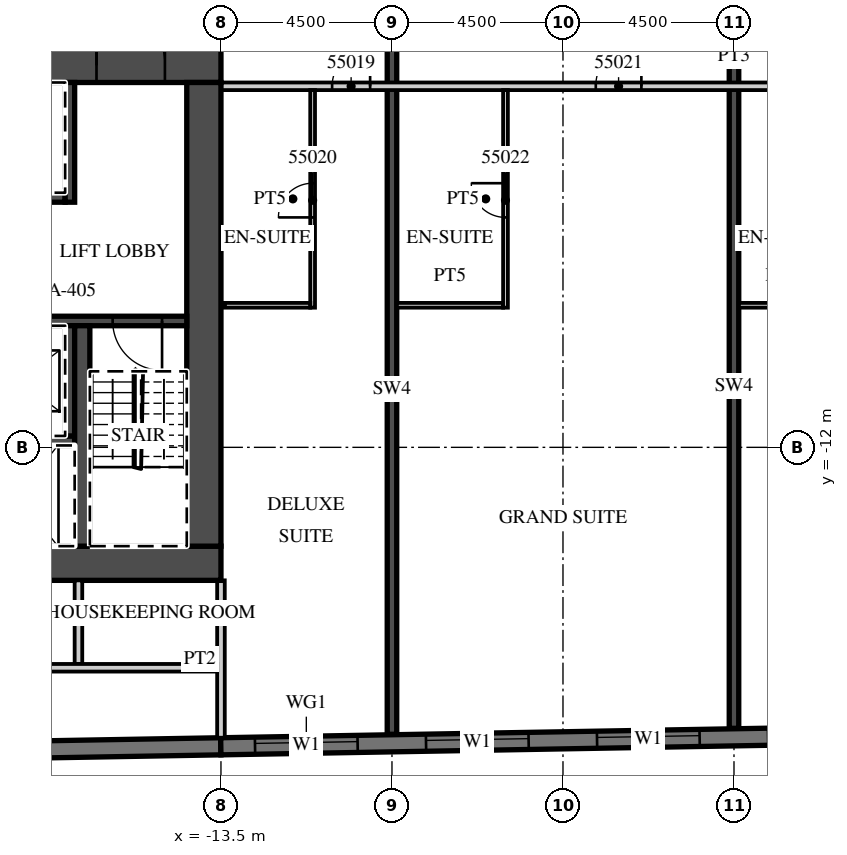
"""IFC4 building model, lengths in metres.
Left out: names, types, materials, properties, quantities, classifications, styles, units other than length and angle.
Written with IfcOpenShell. Run it as: python <this file> out.ifc"""

import sys

from ifc_helpers import new_model, si_unit, direction, frame, frame_2d, origin, place, context, subcontext, project, spatial, rectangle, extrude, element, fill, save


model = new_model("IFC4")
c1 = context("Model", 3, precision=1e-05, world=origin(), true_north=direction((0.0, 1.0)))
c2 = subcontext(c1, "Body", "Model", "MODEL_VIEW")
j1 = project(units=[si_unit("LENGTHUNIT", "METRE"), si_unit("PLANEANGLEUNIT", "RADIAN")], contexts=[c1])
p1 = place(None, origin())
s1 = spatial("IfcSite", under=j1, at=p1, CompositionType="ELEMENT")
p2 = place(p1, origin())
s2 = spatial("IfcBuilding", under=s1, at=p2, CompositionType="ELEMENT")
p3 = place(p2, frame((0.0, 0.0, 227.6)))
s3 = spatial("IfcBuildingStorey", under=s2, at=p3, CompositionType="ELEMENT", Elevation=227.6)
p4 = place(p3, frame((-9.0, -19.55, 0.0), z_axis=(0.0, 0.0, 1.0), x_axis=(0.0, 1.0, 0.0)))
e1 = element("IfcWall", 1, at=p4, inside=s3, PredefinedType="SHEAR", context=c2, shape_type="SweptSolid", body=[
    extrude(rectangle(XDim=18.15, YDim=0.25, at=frame_2d((9.075, 0.0))), origin(), (0.0, 0.0, 1.0), 3.3),
])
p5 = place(p3, frame((0.0, -19.393, 0.0), z_axis=(0.0, 0.0, 1.0), x_axis=(0.0, 1.0, 0.0)))
e2 = element("IfcWall", 2, at=p5, inside=s3, PredefinedType="SHEAR", context=c2, shape_type="SweptSolid", body=[
    extrude(rectangle(XDim=17.993, YDim=0.25, at=frame_2d((8.997, 0.0))), origin(), (0.0, 0.0, 1.0), 3.3),
])
p6 = place(p3, frame((-31.504, -20.18, 0.0), z_axis=(0.0, 0.0, 1.0), x_axis=(0.999847677887, 0.017453395744, 0.0)))
e3 = element("IfcWall", 3, at=p6, inside=s3, PredefinedType="SOLIDWALL", context=c2, shape_type="SweptSolid", body=[
    extrude(rectangle(XDim=18.003, YDim=0.45, at=frame_2d((9.001, 0.0))), origin(), (0.0, 0.0, 1.0), 3.02),
])
p7 = place(p3, frame((-13.504, -19.866, 0.0), z_axis=(0.0, 0.0, 1.0), x_axis=(0.999847672978, 0.017453676992, 0.0)))
e4 = element("IfcWall", 4, at=p7, inside=s3, PredefinedType="SOLIDWALL", context=c2, shape_type="SweptSolid", body=[
    extrude(rectangle(XDim=52.86, YDim=0.45, at=frame_2d((26.43, 0.0))), origin(), (0.0, 0.0, 1.0), 3.02),
])
p8 = place(p7, frame((0.9, 0.0, 0.45)))
e5 = element("IfcOpeningElement", 5, at=p8, cuts=e4, PredefinedType="OPENING", context=c2, shape_type="SweptSolid", body=[
    extrude(rectangle(XDim=2.7, YDim=2.25, at=frame_2d((1.35, 1.125))), frame((0.0, 0.235, 0.0), z_axis=(0.0, -1.0, 0.0), x_axis=(1.0, 0.0, 0.0)), (0.0, 0.0, 1.0), 0.47),
])
p9 = place(p7, frame((5.401, 0.0, 0.45)))
e6 = element("IfcOpeningElement", 6, at=p9, cuts=e4, PredefinedType="OPENING", context=c2, shape_type="SweptSolid", body=[
    extrude(rectangle(XDim=2.7, YDim=2.25, at=frame_2d((1.35, 1.125))), frame((0.0, 0.235, 0.0), z_axis=(0.0, -1.0, 0.0), x_axis=(1.0, 0.0, 0.0)), (0.0, 0.0, 1.0), 0.47),
])
p10 = place(p7, frame((9.902, 0.0, 0.45)))
e7 = element("IfcOpeningElement", 7, at=p10, cuts=e4, PredefinedType="OPENING", context=c2, shape_type="SweptSolid", body=[
    extrude(rectangle(XDim=2.7, YDim=2.25, at=frame_2d((1.35, 1.125))), frame((0.0, 0.235, 0.0), z_axis=(0.0, -1.0, 0.0), x_axis=(1.0, 0.0, 0.0)), (0.0, 0.0, 1.0), 0.47),
])
p11 = place(p7, frame((14.402, 0.0, 0.45)))
e8 = element("IfcOpeningElement", 8, at=p11, cuts=e4, PredefinedType="OPENING", context=c2, shape_type="SweptSolid", body=[
    extrude(rectangle(XDim=2.7, YDim=2.25, at=frame_2d((1.35, 1.125))), frame((0.0, 0.235, 0.0), z_axis=(0.0, -1.0, 0.0), x_axis=(1.0, 0.0, 0.0)), (0.0, 0.0, 1.0), 0.47),
])
p12 = place(p7, frame((18.903, 0.0, 0.45)))
e9 = element("IfcOpeningElement", 9, at=p12, cuts=e4, PredefinedType="OPENING", context=c2, shape_type="SweptSolid", body=[
    extrude(rectangle(XDim=2.7, YDim=2.25, at=frame_2d((1.35, 1.125))), frame((0.0, 0.235, 0.0), z_axis=(0.0, -1.0, 0.0), x_axis=(1.0, 0.0, 0.0)), (0.0, 0.0, 1.0), 0.47),
])
p13 = place(p7, frame((23.404, 0.0, 0.45)))
e10 = element("IfcOpeningElement", 10, at=p13, cuts=e4, PredefinedType="OPENING", context=c2, shape_type="SweptSolid", body=[
    extrude(rectangle(XDim=2.7, YDim=2.25, at=frame_2d((1.35, 1.125))), frame((0.0, 0.235, 0.0), z_axis=(0.0, -1.0, 0.0), x_axis=(1.0, 0.0, 0.0)), (0.0, 0.0, 1.0), 0.47),
])
p14 = place(p7, frame((27.904, 0.0, 0.45)))
e11 = element("IfcOpeningElement", 11, at=p14, cuts=e4, PredefinedType="OPENING", context=c2, shape_type="SweptSolid", body=[
    extrude(rectangle(XDim=2.7, YDim=2.25, at=frame_2d((1.35, 1.125))), frame((0.0, 0.235, 0.0), z_axis=(0.0, -1.0, 0.0), x_axis=(1.0, 0.0, 0.0)), (0.0, 0.0, 1.0), 0.47),
])
p15 = place(p7, frame((32.405, 0.0, 0.45)))
e12 = element("IfcOpeningElement", 12, at=p15, cuts=e4, PredefinedType="OPENING", context=c2, shape_type="SweptSolid", body=[
    extrude(rectangle(XDim=2.7, YDim=2.25, at=frame_2d((1.35, 1.125))), frame((0.0, 0.235, 0.0), z_axis=(0.0, -1.0, 0.0), x_axis=(1.0, 0.0, 0.0)), (0.0, 0.0, 1.0), 0.47),
])
p16 = place(p7, frame((36.906, 0.0, 0.45)))
e13 = element("IfcOpeningElement", 13, at=p16, cuts=e4, PredefinedType="OPENING", context=c2, shape_type="SweptSolid", body=[
    extrude(rectangle(XDim=2.7, YDim=2.25, at=frame_2d((1.35, 1.125))), frame((0.0, 0.235, 0.0), z_axis=(0.0, -1.0, 0.0), x_axis=(1.0, 0.0, 0.0)), (0.0, 0.0, 1.0), 0.47),
])
p17 = place(p7, frame((41.406, 0.0, 0.45)))
e14 = element("IfcOpeningElement", 14, at=p17, cuts=e4, PredefinedType="OPENING", context=c2, shape_type="SweptSolid", body=[
    extrude(rectangle(XDim=2.7, YDim=2.25, at=frame_2d((1.35, 1.125))), frame((0.0, 0.235, 0.0), z_axis=(0.0, -1.0, 0.0), x_axis=(1.0, 0.0, 0.0)), (0.0, 0.0, 1.0), 0.47),
])
p18 = place(p7, frame((45.907, 0.0, 0.45)))
e15 = element("IfcOpeningElement", 15, at=p18, cuts=e4, PredefinedType="OPENING", context=c2, shape_type="SweptSolid", body=[
    extrude(rectangle(XDim=2.7, YDim=2.25, at=frame_2d((1.35, 1.125))), frame((0.0, 0.235, 0.0), z_axis=(0.0, -1.0, 0.0), x_axis=(1.0, 0.0, 0.0)), (0.0, 0.0, 1.0), 0.47),
])
p19 = place(p3, frame((-13.5, -19.641, 0.0), z_axis=(0.0, 0.0, 1.0), x_axis=(0.0, 1.0, 0.0)))
e16 = element("IfcWall", 16, at=p19, inside=s3, PredefinedType="PARTITIONING", context=c2, shape_type="SweptSolid", body=[
    extrude(rectangle(XDim=4.141, YDim=0.2, at=frame_2d((2.071, 0.0))), origin(), (0.0, 0.0, 1.0), 3.02),
])
p20 = place(p3, frame((-13.5, -2.5, 0.0), z_axis=(0.0, 0.0, 1.0), x_axis=(1.0, 0.0, 0.0)))
e17 = element("IfcWall", 17, at=p20, inside=s3, PredefinedType="PARTITIONING", context=c2, shape_type="SweptSolid", body=[
    extrude(rectangle(XDim=27.0, YDim=0.2, at=frame_2d((13.5, 0.0))), origin(), (0.0, 0.0, 1.0), 3.02),
])
p21 = place(p20, frame((2.925, 0.0, 0.0)))
e18 = element("IfcOpeningElement", 18, at=p21, cuts=e17, PredefinedType="OPENING", context=c2, shape_type="SweptSolid", body=[
    extrude(rectangle(XDim=1.0, YDim=2.1, at=frame_2d((0.5, 1.05))), frame((0.0, 0.11, 0.0), z_axis=(0.0, -1.0, 0.0), x_axis=(1.0, 0.0, 0.0)), (0.0, 0.0, 1.0), 0.22),
])
p22 = place(p20, frame((9.863, 0.0, 0.0)))
e19 = element("IfcOpeningElement", 19, at=p22, cuts=e17, PredefinedType="OPENING", context=c2, shape_type="SweptSolid", body=[
    extrude(rectangle(XDim=1.2, YDim=2.1, at=frame_2d((0.6, 1.05))), frame((0.0, 0.11, 0.0), z_axis=(0.0, -1.0, 0.0), x_axis=(1.0, 0.0, 0.0)), (0.0, 0.0, 1.0), 0.22),
])
p23 = place(p20, frame((16.45, 0.0, 0.0)))
e20 = element("IfcOpeningElement", 20, at=p23, cuts=e17, PredefinedType="OPENING", context=c2, shape_type="SweptSolid", body=[
    extrude(rectangle(XDim=1.0, YDim=2.1, at=frame_2d((0.5, 1.05))), frame((0.0, 0.11, 0.0), z_axis=(0.0, -1.0, 0.0), x_axis=(1.0, 0.0, 0.0)), (0.0, 0.0, 1.0), 0.22),
])
p24 = place(p20, frame((20.925, 0.0, 0.0)))
e21 = element("IfcOpeningElement", 21, at=p24, cuts=e17, PredefinedType="OPENING", context=c2, shape_type="SweptSolid", body=[
    extrude(rectangle(XDim=1.0, YDim=2.1, at=frame_2d((0.5, 1.05))), frame((0.0, 0.11, 0.0), z_axis=(0.0, -1.0, 0.0), x_axis=(1.0, 0.0, 0.0)), (0.0, 0.0, 1.0), 0.22),
])
p25 = place(p20, frame((25.425, 0.0, 0.0)))
e22 = element("IfcOpeningElement", 22, at=p25, cuts=e17, PredefinedType="OPENING", context=c2, shape_type="SweptSolid", body=[
    extrude(rectangle(XDim=1.0, YDim=2.1, at=frame_2d((0.5, 1.05))), frame((0.0, 0.11, 0.0), z_axis=(0.0, -1.0, 0.0), x_axis=(1.0, 0.0, 0.0)), (0.0, 0.0, 1.0), 0.22),
])
p26 = place(p3, frame((-11.088, -8.325, 0.0), z_axis=(0.0, 0.0, 1.0), x_axis=(0.0, 1.0, 0.0)))
e23 = element("IfcWall", 23, at=p26, inside=s3, PredefinedType="PARTITIONING", context=c2, shape_type="SweptSolid", body=[
    extrude(rectangle(XDim=5.725, YDim=0.125, at=frame_2d((2.862, 0.0))), origin(), (0.0, 0.0, 1.0), 3.02),
])
p27 = place(p26, frame((2.375, 0.0, 0.0)))
e24 = element("IfcOpeningElement", 24, at=p27, cuts=e23, PredefinedType="OPENING", context=c2, shape_type="SweptSolid", body=[
    extrude(rectangle(XDim=0.9, YDim=2.1, at=frame_2d((0.45, 1.05))), frame((0.0, 0.073, 0.0), z_axis=(0.0, -1.0, 0.0), x_axis=(1.0, 0.0, 0.0)), (0.0, 0.0, 1.0), 0.145),
])
p28 = place(p3, frame((-13.4, -8.262, 0.0), z_axis=(0.0, 0.0, 1.0), x_axis=(1.0, 0.0, 0.0)))
e25 = element("IfcWall", 25, at=p28, inside=s3, PredefinedType="PARTITIONING", context=c2, shape_type="SweptSolid", body=[
    extrude(rectangle(XDim=2.25, YDim=0.125, at=frame_2d((1.125, 0.0))), origin(), (0.0, 0.0, 1.0), 3.02),
])
p29 = place(p3, frame((-6.013, -8.325, 0.0), z_axis=(0.0, 0.0, 1.0), x_axis=(0.0, 1.0, 0.0)))
e26 = element("IfcWall", 26, at=p29, inside=s3, PredefinedType="PARTITIONING", context=c2, shape_type="SweptSolid", body=[
    extrude(rectangle(XDim=5.725, YDim=0.125, at=frame_2d((2.862, 0.0))), origin(), (0.0, 0.0, 1.0), 3.02),
])
p30 = place(p29, frame((2.375, 0.0, 0.0)))
e27 = element("IfcOpeningElement", 27, at=p30, cuts=e26, PredefinedType="OPENING", context=c2, shape_type="SweptSolid", body=[
    extrude(rectangle(XDim=0.9, YDim=2.1, at=frame_2d((0.45, 1.05))), frame((0.0, 0.073, 0.0), z_axis=(0.0, -1.0, 0.0), x_axis=(1.0, 0.0, 0.0)), (0.0, 0.0, 1.0), 0.145),
])
p31 = place(p3, frame((-8.875, -8.262, 0.0), z_axis=(0.0, 0.0, 1.0), x_axis=(1.0, 0.0, 0.0)))
e28 = element("IfcWall", 28, at=p31, inside=s3, PredefinedType="PARTITIONING", context=c2, shape_type="SweptSolid", body=[
    extrude(rectangle(XDim=2.8, YDim=0.125, at=frame_2d((1.4, 0.0))), origin(), (0.0, 0.0, 1.0), 3.02),
])
p32 = place(p3, frame((0.125, -8.262, 0.0), z_axis=(0.0, 0.0, 1.0), x_axis=(1.0, 0.0, 0.0)))
e29 = element("IfcWall", 29, at=p32, inside=s3, PredefinedType="PARTITIONING", context=c2, shape_type="SweptSolid", body=[
    extrude(rectangle(XDim=2.25, YDim=0.125, at=frame_2d((1.125, 0.0))), origin(), (0.0, 0.0, 1.0), 3.02),
])
p33 = place(p3, frame((-31.5, -1.95, 0.0), z_axis=(0.0, 0.0, 1.0), x_axis=(1.0, 0.0, 0.0)))
e30 = element("IfcWall", 30, at=p33, inside=s3, PredefinedType="SHEAR", context=c2, shape_type="SweptSolid", body=[
    extrude(rectangle(XDim=18.0, YDim=0.9, at=frame_2d((9.0, 0.0))), origin(), (0.0, 0.0, 1.0), 3.02),
])
p34 = place(p33, frame((14.725, 0.0, 0.0)))
e31 = element("IfcOpeningElement", 31, at=p34, cuts=e30, PredefinedType="OPENING", context=c2, shape_type="SweptSolid", body=[
    extrude(rectangle(XDim=1.8, YDim=2.1, at=frame_2d((0.9, 1.05))), frame((0.0, 0.46, 0.0), z_axis=(0.0, -1.0, 0.0), x_axis=(1.0, 0.0, 0.0)), (0.0, 0.0, 1.0), 0.92),
])
p35 = place(p3, frame((-20.3, -15.05, 0.0), z_axis=(0.0, 0.0, 1.0), x_axis=(1.0, 0.0, 0.0)))
e32 = element("IfcWall", 32, at=p35, inside=s3, PredefinedType="SHEAR", context=c2, shape_type="SweptSolid", body=[
    extrude(rectangle(XDim=6.8, YDim=0.9, at=frame_2d((3.4, 0.0))), origin(), (0.0, 0.0, 1.0), 3.02),
])
p36 = place(p35, frame((0.875, 0.0, 0.0)))
e33 = element("IfcOpeningElement", 33, at=p36, cuts=e32, PredefinedType="OPENING", context=c2, shape_type="SweptSolid", body=[
    extrude(rectangle(XDim=1.2, YDim=2.1, at=frame_2d((0.6, 1.05))), frame((0.0, 0.46, 0.0), z_axis=(0.0, -1.0, 0.0), x_axis=(1.0, 0.0, 0.0)), (0.0, 0.0, 1.0), 0.92),
])
p37 = place(p3, frame((-13.95, -14.6, 0.0), z_axis=(0.0, 0.0, 1.0), x_axis=(0.0, 1.0, 0.0)))
e34 = element("IfcWall", 34, at=p37, inside=s3, PredefinedType="SHEAR", context=c2, shape_type="SweptSolid", body=[
    extrude(rectangle(XDim=12.2, YDim=0.9, at=frame_2d((6.1, 0.0))), origin(), (0.0, 0.0, 1.0), 3.02),
])
p38 = place(p3, frame((-30.6, -5.425, 0.0), z_axis=(0.0, 0.0, 1.0), x_axis=(1.0, 0.0, 0.0)))
e35 = element("IfcWall", 35, at=p38, inside=s3, PredefinedType="SHEAR", context=c2, shape_type="SweptSolid", body=[
    extrude(rectangle(XDim=13.0, YDim=0.25, at=frame_2d((6.5, 0.0))), origin(), (0.0, 0.0, 1.0), 3.02),
])
p39 = place(p38, frame((3.325, 0.0, 0.0)))
e36 = element("IfcOpeningElement", 36, at=p39, cuts=e35, PredefinedType="OPENING", context=c2, shape_type="SweptSolid", body=[
    extrude(rectangle(XDim=1.2, YDim=2.1, at=frame_2d((0.6, 1.05))), frame((0.0, 0.135, 0.0), z_axis=(0.0, -1.0, 0.0), x_axis=(1.0, 0.0, 0.0)), (0.0, 0.0, 1.0), 0.27),
])
p40 = place(p38, frame((5.925, 0.0, 0.0)))
e37 = element("IfcOpeningElement", 37, at=p40, cuts=e35, PredefinedType="OPENING", context=c2, shape_type="SweptSolid", body=[
    extrude(rectangle(XDim=1.2, YDim=2.1, at=frame_2d((0.6, 1.05))), frame((0.0, 0.135, 0.0), z_axis=(0.0, -1.0, 0.0), x_axis=(1.0, 0.0, 0.0)), (0.0, 0.0, 1.0), 0.27),
])
p41 = place(p3, frame((-17.475, -5.55, 0.0), z_axis=(0.0, 0.0, 1.0), x_axis=(0.0, 1.0, 0.0)))
e38 = element("IfcWall", 38, at=p41, inside=s3, PredefinedType="SHEAR", context=c2, shape_type="SweptSolid", body=[
    extrude(rectangle(XDim=3.15, YDim=0.25, at=frame_2d((1.575, 0.0))), origin(), (0.0, 0.0, 1.0), 3.02),
])
p42 = place(p3, frame((-30.6, -8.675, 0.0), z_axis=(0.0, 0.0, 1.0), x_axis=(1.0, 0.0, 0.0)))
e39 = element("IfcWall", 39, at=p42, inside=s3, PredefinedType="SHEAR", context=c2, shape_type="SweptSolid", body=[
    extrude(rectangle(XDim=16.2, YDim=0.25, at=frame_2d((8.1, 0.0))), origin(), (0.0, 0.0, 1.0), 3.02),
])
p43 = place(p42, frame((8.55, 0.0, 0.0)))
e40 = element("IfcOpeningElement", 40, at=p43, cuts=e39, PredefinedType="OPENING", context=c2, shape_type="SweptSolid", body=[
    extrude(rectangle(XDim=1.2, YDim=2.1, at=frame_2d((0.6, 1.05))), frame((0.0, 0.135, 0.0), z_axis=(0.0, -1.0, 0.0), x_axis=(1.0, 0.0, 0.0)), (0.0, 0.0, 1.0), 0.27),
])
p44 = place(p42, frame((11.2, 0.0, 0.0)))
e41 = element("IfcOpeningElement", 41, at=p44, cuts=e39, PredefinedType="OPENING", context=c2, shape_type="SweptSolid", body=[
    extrude(rectangle(XDim=1.2, YDim=2.1, at=frame_2d((0.6, 1.05))), frame((0.0, 0.135, 0.0), z_axis=(0.0, -1.0, 0.0), x_axis=(1.0, 0.0, 0.0)), (0.0, 0.0, 1.0), 0.27),
])
p45 = place(p42, frame((14.25, 0.0, 0.0)))
e42 = element("IfcOpeningElement", 42, at=p45, cuts=e39, PredefinedType="OPENING", context=c2, shape_type="SweptSolid", body=[
    extrude(rectangle(XDim=1.3, YDim=2.1, at=frame_2d((0.65, 1.05))), frame((0.0, 0.135, 0.0), z_axis=(0.0, -1.0, 0.0), x_axis=(1.0, 0.0, 0.0)), (0.0, 0.0, 1.0), 0.27),
])
p46 = place(p42, frame((1.488, 0.0, 0.0)))
e43 = element("IfcOpeningElement", 43, at=p46, cuts=e39, PredefinedType="OPENING", context=c2, shape_type="SweptSolid", body=[
    extrude(rectangle(XDim=1.0, YDim=2.1, at=frame_2d((0.5, 1.05))), frame((0.0, 0.135, 0.0), z_axis=(0.0, -1.0, 0.0), x_axis=(1.0, 0.0, 0.0)), (0.0, 0.0, 1.0), 0.27),
])
p47 = place(p42, frame((5.462, 0.0, 0.0)))
e44 = element("IfcOpeningElement", 44, at=p47, cuts=e39, PredefinedType="OPENING", context=c2, shape_type="SweptSolid", body=[
    extrude(rectangle(XDim=1.0, YDim=2.1, at=frame_2d((0.5, 1.05))), frame((0.0, 0.135, 0.0), z_axis=(0.0, -1.0, 0.0), x_axis=(1.0, 0.0, 0.0)), (0.0, 0.0, 1.0), 0.27),
])
p48 = place(p3, frame((-30.6, -11.825, 0.0), z_axis=(0.0, 0.0, 1.0), x_axis=(1.0, 0.0, 0.0)))
e45 = element("IfcWall", 45, at=p48, inside=s3, PredefinedType="SHEAR", context=c2, shape_type="SweptSolid", body=[
    extrude(rectangle(XDim=13.25, YDim=0.25, at=frame_2d((6.625, 0.0))), origin(), (0.0, 0.0, 1.0), 3.02),
])
p49 = place(p3, frame((-17.475, -11.7, 0.0), z_axis=(0.0, 0.0, 1.0), x_axis=(0.0, 1.0, 0.0)))
e46 = element("IfcWall", 46, at=p49, inside=s3, PredefinedType="SHEAR", context=c2, shape_type="SweptSolid", body=[
    extrude(rectangle(XDim=2.9, YDim=0.25, at=frame_2d((1.45, 0.0))), origin(), (0.0, 0.0, 1.0), 3.02),
])
p50 = place(p3, frame((-17.15, -14.6, 0.0), z_axis=(0.0, 0.0, 1.0), x_axis=(0.0, 1.0, 0.0)))
e47 = element("IfcWall", 47, at=p50, inside=s3, PredefinedType="SHEAR", context=c2, shape_type="SweptSolid", body=[
    extrude(rectangle(XDim=5.8, YDim=0.4, at=frame_2d((2.9, 0.0))), origin(), (0.0, 0.0, 1.0), 3.02),
])
p51 = place(p3, frame((-17.25, -17.7, 0.0), z_axis=(0.0, 0.0, 1.0), x_axis=(0.0, 1.0, 0.0)))
e48 = element("IfcWall", 48, at=p51, inside=s3, PredefinedType="PARTITIONING", context=c2, shape_type="SweptSolid", body=[
    extrude(rectangle(XDim=2.2, YDim=0.2, at=frame_2d((1.1, 0.0))), origin(), (0.0, 0.0, 1.0), 3.02),
])
p52 = place(p3, frame((-35.864, -17.8, 0.0), z_axis=(0.0, 0.0, 1.0), x_axis=(1.0, 0.0, 0.0)))
e49 = element("IfcWall", 49, at=p52, inside=s3, PredefinedType="PARTITIONING", context=c2, shape_type="SweptSolid", body=[
    extrude(rectangle(XDim=22.264, YDim=0.2, at=frame_2d((11.132, 0.0))), origin(), (0.0, 0.0, 1.0), 3.02),
])
p53 = place(p52, frame((3.551, 0.0, 0.0)))
e50 = element("IfcOpeningElement", 50, at=p53, cuts=e49, PredefinedType="OPENING", context=c2, shape_type="SweptSolid", body=[
    extrude(rectangle(XDim=0.9, YDim=2.1, at=frame_2d((0.45, 1.05))), frame((0.0, 0.11, 0.0), z_axis=(0.0, -1.0, 0.0), x_axis=(1.0, 0.0, 0.0)), (0.0, 0.0, 1.0), 0.22),
])
p54 = place(p52, frame((11.851, 0.0, 0.0)))
e51 = element("IfcOpeningElement", 51, at=p54, cuts=e49, PredefinedType="OPENING", context=c2, shape_type="SweptSolid", body=[
    extrude(rectangle(XDim=0.9, YDim=2.1, at=frame_2d((0.45, 1.05))), frame((0.0, 0.11, 0.0), z_axis=(0.0, -1.0, 0.0), x_axis=(1.0, 0.0, 0.0)), (0.0, 0.0, 1.0), 0.22),
])
p55 = place(p8, origin())
e52 = element("IfcWindow", 52, at=p55, inside=s3, PartitioningType="SINGLE_PANEL", PredefinedType="WINDOW", context=c2, shape_type="SweptSolid", body=[
    extrude(rectangle(XDim=2.7, YDim=2.25, at=frame_2d((1.35, 1.125))), frame((0.0, 0.09, 0.0), z_axis=(0.0, -1.0, 0.0), x_axis=(1.0, 0.0, 0.0)), (0.0, 0.0, 1.0), 0.06),
])
fill(e5, e52)
p56 = place(p9, origin())
e53 = element("IfcWindow", 53, at=p56, inside=s3, PartitioningType="SINGLE_PANEL", PredefinedType="WINDOW", context=c2, shape_type="SweptSolid", body=[
    extrude(rectangle(XDim=2.7, YDim=2.25, at=frame_2d((1.35, 1.125))), frame((0.0, 0.09, 0.0), z_axis=(0.0, -1.0, 0.0), x_axis=(1.0, 0.0, 0.0)), (0.0, 0.0, 1.0), 0.06),
])
fill(e6, e53)
p57 = place(p10, origin())
e54 = element("IfcWindow", 54, at=p57, inside=s3, PartitioningType="SINGLE_PANEL", PredefinedType="WINDOW", context=c2, shape_type="SweptSolid", body=[
    extrude(rectangle(XDim=2.7, YDim=2.25, at=frame_2d((1.35, 1.125))), frame((0.0, 0.09, 0.0), z_axis=(0.0, -1.0, 0.0), x_axis=(1.0, 0.0, 0.0)), (0.0, 0.0, 1.0), 0.06),
])
fill(e7, e54)
p58 = place(p21, origin())
e55 = element("IfcDoor", 55, at=p58, inside=s3, OperationType="SINGLE_SWING_RIGHT", PredefinedType="DOOR", context=c2, shape_type="SweptSolid", body=[
    extrude(rectangle(XDim=1.0, YDim=2.1, at=frame_2d((0.5, 1.05))), frame((0.0, 0.025, 0.0), z_axis=(0.0, -1.0, 0.0), x_axis=(1.0, 0.0, 0.0)), (0.0, 0.0, 1.0), 0.05),
])
fill(e18, e55)
p59 = place(p27, origin())
e56 = element("IfcDoor", 56, at=p59, inside=s3, OperationType="SINGLE_SWING_LEFT", PredefinedType="DOOR", context=c2, shape_type="SweptSolid", body=[
    extrude(rectangle(XDim=0.9, YDim=2.1, at=frame_2d((0.45, 1.05))), frame((0.0, 0.025, 0.0), z_axis=(0.0, -1.0, 0.0), x_axis=(1.0, 0.0, 0.0)), (0.0, 0.0, 1.0), 0.05),
])
fill(e24, e56)
p60 = place(p22, origin())
e57 = element("IfcDoor", 57, at=p60, inside=s3, OperationType="SINGLE_SWING_RIGHT", PredefinedType="DOOR", context=c2, shape_type="SweptSolid", body=[
    extrude(rectangle(XDim=1.2, YDim=2.1, at=frame_2d((0.6, 1.05))), frame((0.0, 0.025, 0.0), z_axis=(0.0, -1.0, 0.0), x_axis=(1.0, 0.0, 0.0)), (0.0, 0.0, 1.0), 0.05),
])
fill(e19, e57)
p61 = place(p30, origin())
e58 = element("IfcDoor", 58, at=p61, inside=s3, OperationType="SINGLE_SWING_RIGHT", PredefinedType="DOOR", context=c2, shape_type="SweptSolid", body=[
    extrude(rectangle(XDim=0.9, YDim=2.1, at=frame_2d((0.45, 1.05))), frame((0.0, 0.025, 0.0), z_axis=(0.0, -1.0, 0.0), x_axis=(1.0, 0.0, 0.0)), (0.0, 0.0, 1.0), 0.05),
])
fill(e27, e58)
p62 = place(p34, origin())
e59 = element("IfcDoor", 59, at=p62, inside=s3, OperationType="DOUBLE_DOOR_DOUBLE_SWING", PredefinedType="DOOR", context=c2, shape_type="SweptSolid", body=[
    extrude(rectangle(XDim=1.8, YDim=2.1, at=frame_2d((0.9, 1.05))), frame((0.0, 0.025, 0.0), z_axis=(0.0, -1.0, 0.0), x_axis=(1.0, 0.0, 0.0)), (0.0, 0.0, 1.0), 0.05),
])
fill(e31, e59)
p63 = place(p45, origin())
e60 = element("IfcDoor", 60, at=p63, inside=s3, OperationType="SINGLE_SWING_RIGHT", PredefinedType="DOOR", context=c2, shape_type="SweptSolid", body=[
    extrude(rectangle(XDim=1.3, YDim=2.1, at=frame_2d((0.65, 1.05))), frame((0.0, 0.025, 0.0), z_axis=(0.0, -1.0, 0.0), x_axis=(1.0, 0.0, 0.0)), (0.0, 0.0, 1.0), 0.05),
])
fill(e42, e60)
save(model, sys.argv[1])
